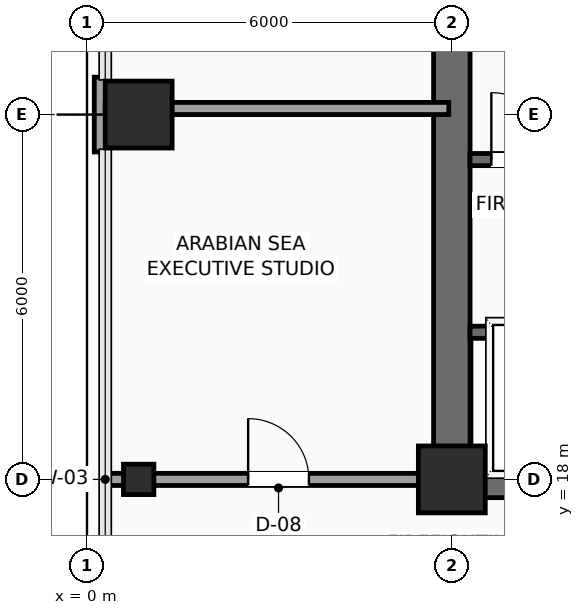
"""IFC4 building model, lengths in metres.
Left out: names, types, materials, properties, quantities, classifications, styles, units other than length and angle.
Written with IfcOpenShell. Run it as: python <this file> out.ifc"""

import sys

from ifc_helpers import new_model, si_unit, direction, frame, frame_2d, origin, origin_2d, place, context, subcontext, project, spatial, rectangle, hollow_rectangle, extrude, element, fill, save


model = new_model("IFC4")
c1 = context("Model", 3, precision=1e-05, world=origin(), true_north=direction((0.0, 1.0)))
c2 = subcontext(c1, "Body", "Model", "MODEL_VIEW")
j1 = project(units=[si_unit("LENGTHUNIT", "METRE"), si_unit("PLANEANGLEUNIT", "RADIAN")], contexts=[c1])
p1 = place(None, origin())
s1 = spatial("IfcSite", under=j1, at=p1, CompositionType="ELEMENT")
p2 = place(p1, origin())
s2 = spatial("IfcBuilding", under=s1, at=p2, CompositionType="ELEMENT")
p3 = place(p2, frame((0.0, 0.0, 123.15)))
s3 = spatial("IfcBuildingStorey", under=s2, at=p3, CompositionType="ELEMENT", Elevation=123.15)
p4 = place(p3, frame((6.0, 18.0, 0.0), z_axis=(0.0, 0.0, 1.0), x_axis=(1.0, 0.0, 0.0)))
e1 = element("IfcColumn", 1, at=p4, inside=s3, PredefinedType="COLUMN", context=c2, shape_type="SweptSolid", body=[
    extrude(rectangle(XDim=1.1, YDim=1.1, at=origin_2d()), origin(), (0.0, 0.0, 1.0), 3.75),
])
p5 = place(p3, frame((0.85, 18.0, 0.0), z_axis=(0.0, 0.0, 1.0), x_axis=(1.0, 0.0, 0.0)))
e2 = element("IfcColumn", 2, at=p5, inside=s3, PredefinedType="COLUMN", context=c2, shape_type="SweptSolid", body=[
    extrude(hollow_rectangle(XDim=0.5, YDim=0.5, WallThickness=0.025, InnerFilletRadius=0.025, OuterFilletRadius=0.04, at=origin_2d()), origin(), (0.0, 0.0, 1.0), 3.75),
])
p6 = place(p3, frame((0.85, 24.0, 0.0), z_axis=(0.0, 0.0, 1.0), x_axis=(1.0, 0.0, 0.0)))
e3 = element("IfcColumn", 3, at=p6, inside=s3, PredefinedType="COLUMN", context=c2, shape_type="SweptSolid", body=[
    extrude(rectangle(XDim=1.1, YDim=1.1, at=origin_2d()), origin(), (0.0, 0.0, 1.0), 3.75),
])
p7 = place(p3, frame((0.24, 23.385, 0.0), z_axis=(0.0, 0.0, 1.0), x_axis=(0.0, 1.0, 0.0)))
e4 = element("IfcWall", 4, at=p7, inside=s3, PredefinedType="SOLIDWALL", context=c2, shape_type="SweptSolid", body=[
    extrude(rectangle(XDim=1.23, YDim=0.24, at=frame_2d((0.615, 0.0))), origin(), (0.0, 0.0, 1.0), 3.525),
])
p8 = place(p3, frame((6.0, 18.0, 0.0), z_axis=(0.0, 0.0, 1.0), x_axis=(1.0, 0.0, 0.0)))
e5 = element("IfcWall", 5, at=p8, inside=s3, PredefinedType="SHEAR", context=c2, shape_type="SweptSolid", body=[
    extrude(rectangle(XDim=12.0, YDim=0.6, at=frame_2d((6.0, 0.0))), origin(), (0.0, 0.0, 1.0), 3.525),
])
p9 = place(p8, frame((7.15, 0.0, 0.0)))
e6 = element("IfcOpeningElement", 6, at=p9, cuts=e5, PredefinedType="OPENING", context=c2, shape_type="SweptSolid", body=[
    extrude(rectangle(XDim=1.6, YDim=2.3, at=frame_2d((0.8, 1.15))), frame((0.0, 0.31, 0.0), z_axis=(0.0, -1.0, 0.0), x_axis=(1.0, 0.0, 0.0)), (0.0, 0.0, 1.0), 0.62),
])
p10 = place(p3, frame((6.0, 18.0, 0.0), z_axis=(0.0, 0.0, 1.0), x_axis=(0.0, 1.0, 0.0)))
e7 = element("IfcWall", 7, at=p10, inside=s3, PredefinedType="SHEAR", context=c2, shape_type="SweptSolid", body=[
    extrude(rectangle(XDim=9.6, YDim=0.6, at=frame_2d((4.8, 0.0))), origin(), (0.0, 0.0, 1.0), 3.525),
])
p11 = place(p3, frame((6.3, 23.26, 0.0), z_axis=(0.0, 0.0, 1.0), x_axis=(1.0, 0.0, 0.0)))
e8 = element("IfcWall", 8, at=p11, inside=s3, PredefinedType="SHEAR", context=c2, shape_type="SweptSolid", body=[
    extrude(rectangle(XDim=8.88, YDim=0.2, at=frame_2d((4.44, 0.0))), origin(), (0.0, 0.0, 1.0), 3.525),
])
p12 = place(p11, frame((0.35, 0.0, 0.0)))
e9 = element("IfcOpeningElement", 9, at=p12, cuts=e8, PredefinedType="OPENING", context=c2, shape_type="SweptSolid", body=[
    extrude(rectangle(XDim=1.1, YDim=2.2, at=frame_2d((0.55, 1.1))), frame((0.0, 0.11, 0.0), z_axis=(0.0, -1.0, 0.0), x_axis=(1.0, 0.0, 0.0)), (0.0, 0.0, 1.0), 0.22),
])
p13 = place(p3, frame((6.3, 20.42, 0.0), z_axis=(0.0, 0.0, 1.0), x_axis=(1.0, 0.0, 0.0)))
e10 = element("IfcWall", 10, at=p13, inside=s3, PredefinedType="SHEAR", context=c2, shape_type="SweptSolid", body=[
    extrude(rectangle(XDim=4.95, YDim=0.2, at=frame_2d((2.475, 0.0))), origin(), (0.0, 0.0, 1.0), 3.525),
])
p14 = place(p13, frame((0.65, 0.0, 0.0)))
e11 = element("IfcOpeningElement", 11, at=p14, cuts=e10, PredefinedType="OPENING", context=c2, shape_type="SweptSolid", body=[
    extrude(rectangle(XDim=1.1, YDim=2.2, at=frame_2d((0.55, 1.1))), frame((0.0, 0.11, 0.0), z_axis=(0.0, -1.0, 0.0), x_axis=(1.0, 0.0, 0.0)), (0.0, 0.0, 1.0), 0.22),
])
p15 = place(p13, frame((3.05, 0.0, 0.0)))
e12 = element("IfcOpeningElement", 12, at=p15, cuts=e10, PredefinedType="OPENING", context=c2, shape_type="SweptSolid", body=[
    extrude(rectangle(XDim=1.1, YDim=2.2, at=frame_2d((0.55, 1.1))), frame((0.0, 0.11, 0.0), z_axis=(0.0, -1.0, 0.0), x_axis=(1.0, 0.0, 0.0)), (0.0, 0.0, 1.0), 0.22),
])
p16 = place(p3, frame((0.3, 18.0, 0.0), z_axis=(0.0, 0.0, 1.0), x_axis=(1.0, 0.0, 0.0)))
e13 = element("IfcWall", 13, at=p16, inside=s3, PredefinedType="PARTITIONING", context=c2, shape_type="SweptSolid", body=[
    extrude(rectangle(XDim=5.65, YDim=0.2, at=frame_2d((2.825, 0.0))), origin(), (0.0, 0.0, 1.0), 3.017),
])
p17 = place(p16, frame((2.35, 0.0, 0.0)))
e14 = element("IfcOpeningElement", 14, at=p17, cuts=e13, PredefinedType="OPENING", context=c2, shape_type="SweptSolid", body=[
    extrude(rectangle(XDim=1.0, YDim=2.2, at=frame_2d((0.5, 1.1))), frame((0.0, 0.11, 0.0), z_axis=(0.0, -1.0, 0.0), x_axis=(1.0, 0.0, 0.0)), (0.0, 0.0, 1.0), 0.22),
])
p18 = place(p3, frame((0.3, 24.1, 0.0), z_axis=(0.0, 0.0, 1.0), x_axis=(1.0, 0.0, 0.0)))
e15 = element("IfcWall", 15, at=p18, inside=s3, PredefinedType="PARTITIONING", context=c2, shape_type="SweptSolid", body=[
    extrude(rectangle(XDim=5.65, YDim=0.2, at=frame_2d((2.825, 0.0))), origin(), (0.0, 0.0, 1.0), 3.525),
])
p19 = place(p12, origin())
e16 = element("IfcDoor", 16, at=p19, inside=s3, OperationType="SINGLE_SWING_LEFT", PredefinedType="DOOR", context=c2, shape_type="SweptSolid", body=[
    extrude(rectangle(XDim=1.1, YDim=2.2, at=frame_2d((0.55, 1.1))), frame((0.0, 0.025, 0.0), z_axis=(0.0, -1.0, 0.0), x_axis=(1.0, 0.0, 0.0)), (0.0, 0.0, 1.0), 0.05),
])
fill(e9, e16)
p20 = place(p17, origin())
e17 = element("IfcDoor", 17, at=p20, inside=s3, OperationType="SINGLE_SWING_LEFT", PredefinedType="DOOR", context=c2, shape_type="SweptSolid", body=[
    extrude(rectangle(XDim=1.0, YDim=2.2, at=frame_2d((0.5, 1.1))), frame((0.0, 0.025, 0.0), z_axis=(0.0, -1.0, 0.0), x_axis=(1.0, 0.0, 0.0)), (0.0, 0.0, 1.0), 0.05),
])
fill(e14, e17)
save(model, sys.argv[1])
